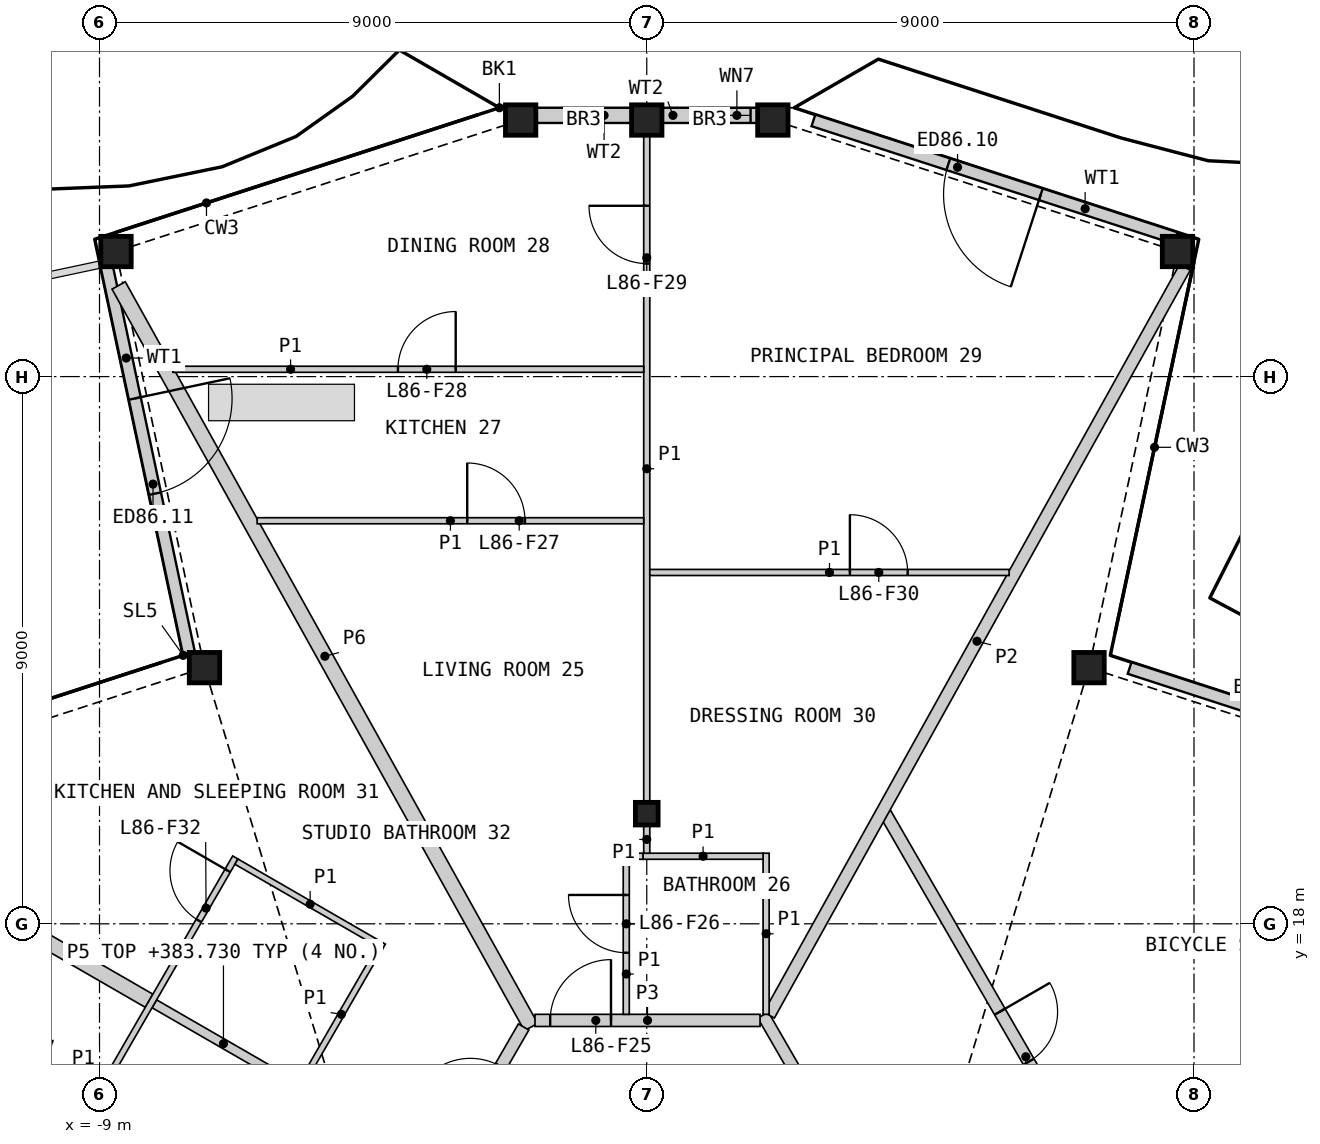
"""IFC4 building model, lengths in metres.
Left out: names, types, materials, properties, quantities, classifications, styles, units other than length and angle.
Written with IfcOpenShell. Run it as: python <this file> out.ifc"""

import sys

from ifc_helpers import new_model, si_unit, direction, frame, frame_2d, origin, origin_2d, place, context, subcontext, project, spatial, rectangle, hollow_rectangle, i_section, extrude, element, fill, save


model = new_model("IFC4")
c1 = context("Model", 3, precision=1e-05, world=origin(), true_north=direction((0.0, 1.0)))
c2 = subcontext(c1, "Body", "Model", "MODEL_VIEW")
j1 = project(units=[si_unit("LENGTHUNIT", "METRE"), si_unit("PLANEANGLEUNIT", "RADIAN")], contexts=[c1])
p1 = place(None, origin())
s1 = spatial("IfcSite", under=j1, at=p1, CompositionType="ELEMENT")
p2 = place(p1, origin())
s2 = spatial("IfcBuilding", under=s1, at=p2, CompositionType="ELEMENT")
p3 = place(p2, frame((0.0, 0.0, 381.4)))
s3 = spatial("IfcBuildingStorey", under=s2, at=p3, CompositionType="ELEMENT", Elevation=381.4)
for number, where, z_axis, x_axis in (
    (1, (7.274, 22.213, 0.0), (0.0, 0.0, 1.0), (1.0, 0.0, 0.0)),
    (2, (8.729, 29.057, 0.0), (0.0, 0.0, 1.0), (1.0, 0.0, 0.0)),
    (3, (2.074, 31.219, 0.0), (0.0, 0.0, 1.0), (1.0, 0.0, 0.0)),
    (4, (0.0, 31.219, 0.0), (0.0, 0.0, 1.0), (1.0, 0.0, 0.0)),
    (5, (-2.074, 31.219, 0.0), (0.0, 0.0, 1.0), (1.0, 0.0, 0.0)),
    (6, (-8.729, 29.057, 0.0), (0.0, 0.0, 1.0), (1.0, 0.0, 0.0)),
    (7, (-7.274, 22.213, 0.0), (0.0, 0.0, 1.0), (1.0, 0.0, 0.0)),
):
    element("IfcColumn", number, at=place(p3, frame(where, z_axis=z_axis, x_axis=x_axis)), inside=s3, PredefinedType="COLUMN", context=c2, shape_type="SweptSolid", body=[
        extrude(hollow_rectangle(XDim=0.5, YDim=0.5, WallThickness=0.03, at=origin_2d()), origin(), (0.0, 0.0, 1.0), 3.4),
    ])
p4 = place(p3, frame((0.0, 19.811, 0.0), z_axis=(0.0, 0.0, 1.0), x_axis=(1.0, 0.0, 0.0)))
e8 = element("IfcColumn", 8, at=p4, inside=s3, PredefinedType="COLUMN", context=c2, shape_type="SweptSolid", body=[
    extrude(i_section(OverallWidth=0.374, OverallDepth=0.372, WebThickness=0.016, FlangeThickness=0.026, at=origin_2d()), origin(), (0.0, 0.0, 1.0), 3.4),
])
p5 = place(p3, frame((13.899, 20.271, 0.0), z_axis=(0.0, 0.0, 1.0), x_axis=(-0.951056402988, 0.3090173431, 0.0)))
e9 = element("IfcWall", 9, at=p5, inside=s3, PredefinedType="SOLIDWALL", context=c2, shape_type="SweptSolid", body=[
    extrude(rectangle(XDim=6.265, YDim=0.2, at=frame_2d((3.133, 0.0))), origin(), (0.0, 0.0, 1.0), 2.634),
])
p6 = place(p5, frame((2.333, 0.0, 0.0)))
e10 = element("IfcOpeningElement", 10, at=p6, cuts=e9, PredefinedType="OPENING", context=c2, shape_type="SweptSolid", body=[
    extrude(rectangle(XDim=1.6, YDim=2.25, at=frame_2d((0.8, 1.125))), frame((0.0, 0.11, 0.0), z_axis=(0.0, -1.0, 0.0), x_axis=(1.0, 0.0, 0.0)), (0.0, 0.0, 1.0), 0.22),
])
p7 = place(p3, frame((8.699, 29.277, 0.0), z_axis=(0.0, 0.0, 1.0), x_axis=(-0.951048671744, 0.309041136379, 0.0)))
e11 = element("IfcWall", 11, at=p7, inside=s3, PredefinedType="SOLIDWALL", context=c2, shape_type="SweptSolid", body=[
    extrude(rectangle(XDim=6.265, YDim=0.2, at=frame_2d((3.133, 0.0))), origin(), (0.0, 0.0, 1.0), 2.634),
])
p8 = place(p7, frame((2.333, 0.0, 0.0)))
e12 = element("IfcOpeningElement", 12, at=p8, cuts=e11, PredefinedType="OPENING", context=c2, shape_type="SweptSolid", body=[
    extrude(rectangle(XDim=1.6, YDim=2.25, at=frame_2d((0.8, 1.125))), frame((0.0, 0.11, 0.0), z_axis=(0.0, -1.0, 0.0), x_axis=(1.0, 0.0, 0.0)), (0.0, 0.0, 1.0), 0.22),
])
p9 = place(p3, frame((2.058, 31.296, 0.0), z_axis=(0.0, 0.0, 1.0), x_axis=(-1.0, 0.0, 0.0)))
e13 = element("IfcWall", 13, at=p9, inside=s3, PredefinedType="SOLIDWALL", context=c2, shape_type="SweptSolid", body=[
    extrude(rectangle(XDim=1.808, YDim=0.25, at=frame_2d((0.904, 0.0))), origin(), (0.0, 0.0, 1.0), 2.634),
])
p10 = place(p9, frame((0.35, 0.0, 1.8)))
e14 = element("IfcOpeningElement", 14, at=p10, cuts=e13, PredefinedType="OPENING", context=c2, shape_type="SweptSolid", body=[
    extrude(rectangle(XDim=0.9, YDim=0.6, at=frame_2d((0.45, 0.3))), frame((0.0, 0.135, 0.0), z_axis=(0.0, -1.0, 0.0), x_axis=(1.0, 0.0, 0.0)), (0.0, 0.0, 1.0), 0.27),
])
p11 = place(p3, frame((-0.25, 31.296, 0.0), z_axis=(0.0, 0.0, 1.0), x_axis=(-1.0, 0.0, 0.0)))
e15 = element("IfcWall", 15, at=p11, inside=s3, PredefinedType="SOLIDWALL", context=c2, shape_type="SweptSolid", body=[
    extrude(rectangle(XDim=1.808, YDim=0.25, at=frame_2d((0.904, 0.0))), origin(), (0.0, 0.0, 1.0), 2.634),
])
p12 = place(p3, frame((-8.905, 28.922, 0.0), z_axis=(0.0, 0.0, 1.0), x_axis=(0.207917488951, -0.978146368285, 0.0)))
e16 = element("IfcWall", 16, at=p12, inside=s3, PredefinedType="SOLIDWALL", context=c2, shape_type="SweptSolid", body=[
    extrude(rectangle(XDim=6.612, YDim=0.2, at=frame_2d((3.306, 0.0))), origin(), (0.0, 0.0, 1.0), 2.634),
])
p13 = place(p12, frame((2.333, 0.0, 0.0)))
e17 = element("IfcOpeningElement", 17, at=p13, cuts=e16, PredefinedType="OPENING", context=c2, shape_type="SweptSolid", body=[
    extrude(rectangle(XDim=1.6, YDim=2.25, at=frame_2d((0.8, 1.125))), frame((0.0, 0.11, 0.0), z_axis=(0.0, -1.0, 0.0), x_axis=(1.0, 0.0, 0.0)), (0.0, 0.0, 1.0), 0.22),
])
p14 = place(p3, frame((-8.685, 28.499, 0.0), z_axis=(0.0, 0.0, 1.0), x_axis=(0.486017177904, -0.873949256412, 0.0)))
e18 = element("IfcWall", 18, at=p14, inside=s3, PredefinedType="PARTITIONING", context=c2, shape_type="SweptSolid", body=[
    extrude(rectangle(XDim=13.956, YDim=0.25, at=frame_2d((6.978, 0.0))), origin(), (0.0, 0.0, 1.0), 2.33),
])
p15 = place(p3, frame((-13.669, 19.9, 0.0), z_axis=(0.0, 0.0, 1.0), x_axis=(0.866032778651, -0.499987226139, 0.0)))
e19 = element("IfcWall", 19, at=p15, inside=s3, PredefinedType="PARTITIONING", context=c2, shape_type="SweptSolid", body=[
    extrude(rectangle(XDim=6.332, YDim=0.25, at=frame_2d((3.166, 0.0))), origin(), (0.0, 0.0, 1.0), 2.33),
])
p16 = place(p3, frame((1.913, 16.498, 0.0), z_axis=(0.0, 0.0, 1.0), x_axis=(0.499974648164, -0.866040040179, 0.0)))
e20 = element("IfcWall", 20, at=p16, inside=s3, PredefinedType="PARTITIONING", context=c2, shape_type="SweptSolid", body=[
    extrude(rectangle(XDim=4.525, YDim=0.2, at=frame_2d((2.263, 0.0))), origin(), (0.0, 0.0, 1.0), 3.1),
])
p17 = place(p3, frame((-4.176, 12.579, 0.0), z_axis=(0.0, 0.0, 1.0), x_axis=(0.500004215162, 0.866022970146, 0.0)))
e21 = element("IfcWall", 21, at=p17, inside=s3, PredefinedType="PARTITIONING", context=c2, shape_type="SweptSolid", body=[
    extrude(rectangle(XDim=4.3, YDim=0.2, at=frame_2d((2.15, 0.0))), origin(), (0.0, 0.0, 1.0), 3.1),
])
p18 = place(p17, frame((2.55, 0.0, 0.0)))
e22 = element("IfcOpeningElement", 22, at=p18, cuts=e21, PredefinedType="OPENING", context=c2, shape_type="SweptSolid", body=[
    extrude(rectangle(XDim=1.0, YDim=2.1, at=frame_2d((0.5, 1.05))), frame((0.0, 0.11, 0.0), z_axis=(0.0, -1.0, 0.0), x_axis=(1.0, 0.0, 0.0)), (0.0, 0.0, 1.0), 0.22),
])
p19 = place(p3, frame((-1.838, 16.411, 0.0), z_axis=(0.0, 0.0, 1.0), x_axis=(1.0, 0.0, 0.0)))
e23 = element("IfcWall", 23, at=p19, inside=s3, PredefinedType="PARTITIONING", context=c2, shape_type="SweptSolid", body=[
    extrude(rectangle(XDim=3.701, YDim=0.2, at=frame_2d((1.851, 0.0))), origin(), (0.0, 0.0, 1.0), 3.1),
])
p20 = place(p19, frame((0.25, 0.0, 0.0)))
e24 = element("IfcOpeningElement", 24, at=p20, cuts=e23, PredefinedType="OPENING", context=c2, shape_type="SweptSolid", body=[
    extrude(rectangle(XDim=1.0, YDim=2.1, at=frame_2d((0.5, 1.05))), frame((0.0, 0.11, 0.0), z_axis=(0.0, -1.0, 0.0), x_axis=(1.0, 0.0, 0.0)), (0.0, 0.0, 1.0), 0.22),
])
p21 = place(p3, frame((3.926, 19.811, 0.0), z_axis=(0.0, 0.0, 1.0), x_axis=(0.500001082559, -0.866024778768, 0.0)))
e25 = element("IfcWall", 25, at=p21, inside=s3, PredefinedType="PARTITIONING", context=c2, shape_type="SweptSolid", body=[
    extrude(rectangle(XDim=15.094, YDim=0.2, at=frame_2d((7.547, 0.0))), origin(), (0.0, 0.0, 1.0), 2.33),
])
p22 = place(p21, frame((3.761, 0.0, 0.0)))
e26 = element("IfcOpeningElement", 26, at=p22, cuts=e25, PredefinedType="OPENING", context=c2, shape_type="SweptSolid", body=[
    extrude(rectangle(XDim=0.95, YDim=2.1, at=frame_2d((0.475, 1.05))), frame((0.0, 0.11, 0.0), z_axis=(0.0, -1.0, 0.0), x_axis=(1.0, 0.0, 0.0)), (0.0, 0.0, 1.0), 0.22),
])
p23 = place(p3, frame((2.012, 16.498, 0.0), z_axis=(0.0, 0.0, 1.0), x_axis=(0.485991996179, 0.873963259897, 0.0)))
e27 = element("IfcWall", 27, at=p23, inside=s3, PredefinedType="PARTITIONING", context=c2, shape_type="SweptSolid", body=[
    extrude(rectangle(XDim=14.073, YDim=0.2, at=frame_2d((7.036, 0.0))), origin(), (0.0, 0.0, 1.0), 2.33),
])
p24 = place(p3, frame((-8.098, 16.684, 0.0), z_axis=(0.0, 0.0, 1.0), x_axis=(0.866036909293, -0.499980071345, 0.0)))
e28 = element("IfcWall", 28, at=p24, inside=s3, PredefinedType="PLUMBINGWALL", context=c2, shape_type="SweptSolid", body=[
    extrude(rectangle(XDim=2.625, YDim=0.15, at=frame_2d((1.312, 0.0))), origin(), (0.0, 0.0, 1.0), 2.33),
])
p25 = place(p3, frame((0.0, 20.008, 0.0), z_axis=(0.0, 0.0, 1.0), x_axis=(0.0, 1.0, 0.0)))
e29 = element("IfcWall", 29, at=p25, inside=s3, PredefinedType="PARTITIONING", context=c2, shape_type="SweptSolid", body=[
    extrude(rectangle(XDim=10.951, YDim=0.1, at=frame_2d((5.476, 0.0))), origin(), (0.0, 0.0, 1.0), 2.33),
])
p26 = place(p25, frame((8.851, 0.0, 0.0)))
e30 = element("IfcOpeningElement", 30, at=p26, cuts=e29, PredefinedType="OPENING", context=c2, shape_type="SweptSolid", body=[
    extrude(rectangle(XDim=0.95, YDim=2.1, at=frame_2d((0.475, 1.05))), frame((0.0, 0.06, 0.0), z_axis=(0.0, -1.0, 0.0), x_axis=(1.0, 0.0, 0.0)), (0.0, 0.0, 1.0), 0.12),
])
p27 = place(p3, frame((-7.793, 27.12, 0.0), z_axis=(0.0, 0.0, 1.0), x_axis=(1.0, 0.0, 0.0)))
e31 = element("IfcWall", 31, at=p27, inside=s3, PredefinedType="PARTITIONING", context=c2, shape_type="SweptSolid", body=[
    extrude(rectangle(XDim=7.743, YDim=0.1, at=frame_2d((3.872, 0.0))), origin(), (0.0, 0.0, 1.0), 2.33),
])
p28 = place(p27, frame((3.701, 0.0, 0.0)))
e32 = element("IfcOpeningElement", 32, at=p28, cuts=e31, PredefinedType="OPENING", context=c2, shape_type="SweptSolid", body=[
    extrude(rectangle(XDim=0.95, YDim=2.1, at=frame_2d((0.475, 1.05))), frame((0.0, 0.06, 0.0), z_axis=(0.0, -1.0, 0.0), x_axis=(1.0, 0.0, 0.0)), (0.0, 0.0, 1.0), 0.12),
])
p29 = place(p3, frame((-6.408, 24.629, 0.0), z_axis=(0.0, 0.0, 1.0), x_axis=(1.0, 0.0, 0.0)))
e33 = element("IfcWall", 33, at=p29, inside=s3, PredefinedType="PARTITIONING", context=c2, shape_type="SweptSolid", body=[
    extrude(rectangle(XDim=6.358, YDim=0.1, at=frame_2d((3.179, 0.0))), origin(), (0.0, 0.0, 1.0), 2.33),
])
p30 = place(p29, frame((3.455, 0.0, 0.0)))
e34 = element("IfcOpeningElement", 34, at=p30, cuts=e33, PredefinedType="OPENING", context=c2, shape_type="SweptSolid", body=[
    extrude(rectangle(XDim=0.95, YDim=2.1, at=frame_2d((0.475, 1.05))), frame((0.0, 0.06, 0.0), z_axis=(0.0, -1.0, 0.0), x_axis=(1.0, 0.0, 0.0)), (0.0, 0.0, 1.0), 0.12),
])
p31 = place(p3, frame((0.05, 23.778, 0.0), z_axis=(0.0, 0.0, 1.0), x_axis=(1.0, 0.0, 0.0)))
e35 = element("IfcWall", 35, at=p31, inside=s3, PredefinedType="PARTITIONING", context=c2, shape_type="SweptSolid", body=[
    extrude(rectangle(XDim=5.91, YDim=0.1, at=frame_2d((2.955, 0.0))), origin(), (0.0, 0.0, 1.0), 2.33),
])
p32 = place(p31, frame((3.291, 0.0, 0.0)))
e36 = element("IfcOpeningElement", 36, at=p32, cuts=e35, PredefinedType="OPENING", context=c2, shape_type="SweptSolid", body=[
    extrude(rectangle(XDim=0.95, YDim=2.1, at=frame_2d((0.475, 1.05))), frame((0.0, 0.06, 0.0), z_axis=(0.0, -1.0, 0.0), x_axis=(1.0, 0.0, 0.0)), (0.0, 0.0, 1.0), 0.12),
])
p33 = place(p3, frame((-9.517, 14.328, 0.0), z_axis=(0.0, 0.0, 1.0), x_axis=(0.499996545922, 0.866027397988, 0.0)))
e37 = element("IfcWall", 37, at=p33, inside=s3, PredefinedType="PARTITIONING", context=c2, shape_type="SweptSolid", body=[
    extrude(rectangle(XDim=5.5, YDim=0.1, at=frame_2d((2.75, 0.0))), origin(), (0.0, 0.0, 1.0), 2.33),
])
p34 = place(p33, frame((4.3, 0.0, 0.0)))
e38 = element("IfcOpeningElement", 38, at=p34, cuts=e37, PredefinedType="OPENING", context=c2, shape_type="SweptSolid", body=[
    extrude(rectangle(XDim=0.95, YDim=2.1, at=frame_2d((0.475, 1.05))), frame((0.0, 0.06, 0.0), z_axis=(0.0, -1.0, 0.0), x_axis=(1.0, 0.0, 0.0)), (0.0, 0.0, 1.0), 0.12),
])
p35 = place(p33, frame((0.25, 0.0, 0.0)))
e39 = element("IfcOpeningElement", 39, at=p35, cuts=e37, PredefinedType="OPENING", context=c2, shape_type="SweptSolid", body=[
    extrude(rectangle(XDim=0.95, YDim=2.1, at=frame_2d((0.475, 1.05))), frame((0.0, 0.06, 0.0), z_axis=(0.0, -1.0, 0.0), x_axis=(1.0, 0.0, 0.0)), (0.0, 0.0, 1.0), 0.12),
])
p36 = place(p3, frame((-6.748, 19.023, 0.0), z_axis=(0.0, 0.0, 1.0), x_axis=(0.866034573852, -0.49998411664, 0.0)))
e40 = element("IfcWall", 40, at=p36, inside=s3, PredefinedType="PARTITIONING", context=c2, shape_type="SweptSolid", body=[
    extrude(rectangle(XDim=2.8, YDim=0.1, at=frame_2d((1.4, 0.0))), origin(), (0.0, 0.0, 1.0), 2.33),
])
p37 = place(p3, frame((-5.654, 15.418, 0.0), z_axis=(0.0, 0.0, 1.0), x_axis=(0.500048846702, 0.865997200291, 0.0)))
e41 = element("IfcWall", 41, at=p37, inside=s3, PredefinedType="PARTITIONING", context=c2, shape_type="SweptSolid", body=[
    extrude(rectangle(XDim=2.525, YDim=0.1, at=frame_2d((1.263, 0.0))), origin(), (0.0, 0.0, 1.0), 2.33),
])
p38 = place(p3, frame((1.963, 16.511, 0.0), z_axis=(0.0, 0.0, 1.0), x_axis=(0.0, 1.0, 0.0)))
e42 = element("IfcWall", 42, at=p38, inside=s3, PredefinedType="PARTITIONING", context=c2, shape_type="SweptSolid", body=[
    extrude(rectangle(XDim=2.65, YDim=0.1, at=frame_2d((1.325, 0.0))), origin(), (0.0, 0.0, 1.0), 2.33),
])
p39 = place(p3, frame((-0.337, 16.511, 0.0), z_axis=(0.0, 0.0, 1.0), x_axis=(0.0, 1.0, 0.0)))
e43 = element("IfcWall", 43, at=p39, inside=s3, PredefinedType="PARTITIONING", context=c2, shape_type="SweptSolid", body=[
    extrude(rectangle(XDim=2.649, YDim=0.1, at=frame_2d((1.325, 0.0))), origin(), (0.0, 0.0, 1.0), 2.33),
])
p40 = place(p39, frame((1.013, 0.0, 0.0)))
e44 = element("IfcOpeningElement", 44, at=p40, cuts=e43, PredefinedType="OPENING", context=c2, shape_type="SweptSolid", body=[
    extrude(rectangle(XDim=0.95, YDim=2.1, at=frame_2d((0.475, 1.05))), frame((0.0, 0.06, 0.0), z_axis=(0.0, -1.0, 0.0), x_axis=(1.0, 0.0, 0.0)), (0.0, 0.0, 1.0), 0.12),
])
p41 = place(p3, frame((-0.06, 19.111, 0.0), z_axis=(0.0, 0.0, 1.0), x_axis=(1.0, 0.0, 0.0)))
e45 = element("IfcWall", 45, at=p41, inside=s3, PredefinedType="PARTITIONING", context=c2, shape_type="SweptSolid", body=[
    extrude(rectangle(XDim=1.973, YDim=0.1, at=frame_2d((0.987, 0.0))), origin(), (0.0, 0.0, 1.0), 2.33),
])
p42 = place(p3, frame((0.0, 19.161, 0.0), z_axis=(0.0, 0.0, 1.0), x_axis=(0.0, 1.0, 0.0)))
e46 = element("IfcWall", 46, at=p42, inside=s3, PredefinedType="PARTITIONING", context=c2, shape_type="SweptSolid", body=[
    extrude(rectangle(XDim=0.453, YDim=0.1, at=frame_2d((0.227, 0.0))), origin(), (0.0, 0.0, 1.0), 2.33),
])
p43 = place(p3, frame((-0.287, 19.11, 0.0), z_axis=(0.0, 0.0, 1.0), x_axis=(0.999994683407, 0.003260852229, 0.0)))
e47 = element("IfcWall", 47, at=p43, inside=s3, PredefinedType="PARTITIONING", context=c2, shape_type="SweptSolid", body=[
    extrude(rectangle(XDim=0.225, YDim=0.1, at=frame_2d((0.112, 0.0))), origin(), (0.0, 0.0, 1.0), 2.33),
])
p44 = place(p8, origin())
e48 = element("IfcDoor", 48, at=p44, inside=s3, OperationType="DOUBLE_DOOR_SINGLE_SWING", PredefinedType="DOOR", context=c2, shape_type="SweptSolid", body=[
    extrude(rectangle(XDim=1.6, YDim=2.25, at=frame_2d((0.8, 1.125))), frame((0.0, 0.025, 0.0), z_axis=(0.0, -1.0, 0.0), x_axis=(1.0, 0.0, 0.0)), (0.0, 0.0, 1.0), 0.05),
])
fill(e12, e48)
p45 = place(p10, origin())
e49 = element("IfcWindow", 49, at=p45, inside=s3, PartitioningType="SINGLE_PANEL", PredefinedType="WINDOW", context=c2, shape_type="SweptSolid", body=[
    extrude(rectangle(XDim=0.9, YDim=0.6, at=frame_2d((0.45, 0.3))), frame((0.0, 0.03, 0.0), z_axis=(0.0, -1.0, 0.0), x_axis=(1.0, 0.0, 0.0)), (0.0, 0.0, 1.0), 0.06),
])
fill(e14, e49)
p46 = place(p13, origin())
e50 = element("IfcDoor", 50, at=p46, inside=s3, OperationType="DOUBLE_DOOR_SINGLE_SWING", PredefinedType="DOOR", context=c2, shape_type="SweptSolid", body=[
    extrude(rectangle(XDim=1.6, YDim=2.25, at=frame_2d((0.8, 1.125))), frame((0.0, 0.025, 0.0), z_axis=(0.0, -1.0, 0.0), x_axis=(1.0, 0.0, 0.0)), (0.0, 0.0, 1.0), 0.05),
])
fill(e17, e50)
p47 = place(p22, origin())
e51 = element("IfcDoor", 51, at=p47, inside=s3, OperationType="SINGLE_SWING_LEFT", PredefinedType="DOOR", context=c2, shape_type="SweptSolid", body=[
    extrude(rectangle(XDim=0.95, YDim=2.1, at=frame_2d((0.475, 1.05))), frame((0.0, 0.025, 0.0), z_axis=(0.0, -1.0, 0.0), x_axis=(1.0, 0.0, 0.0)), (0.0, 0.0, 1.0), 0.05),
])
fill(e26, e51)
p48 = place(p20, origin())
e52 = element("IfcDoor", 52, at=p48, inside=s3, OperationType="SINGLE_SWING_RIGHT", PredefinedType="DOOR", context=c2, shape_type="SweptSolid", body=[
    extrude(rectangle(XDim=1.0, YDim=2.1, at=frame_2d((0.5, 1.05))), frame((0.0, 0.025, 0.0), z_axis=(0.0, -1.0, 0.0), x_axis=(1.0, 0.0, 0.0)), (0.0, 0.0, 1.0), 0.05),
])
fill(e24, e52)
p49 = place(p40, origin())
e53 = element("IfcDoor", 53, at=p49, inside=s3, OperationType="SINGLE_SWING_RIGHT", PredefinedType="DOOR", context=c2, shape_type="SweptSolid", body=[
    extrude(rectangle(XDim=0.95, YDim=2.1, at=frame_2d((0.475, 1.05))), frame((0.0, 0.025, 0.0), z_axis=(0.0, -1.0, 0.0), x_axis=(1.0, 0.0, 0.0)), (0.0, 0.0, 1.0), 0.05),
])
fill(e44, e53)
p50 = place(p30, origin())
e54 = element("IfcDoor", 54, at=p50, inside=s3, OperationType="SINGLE_SWING_LEFT", PredefinedType="DOOR", context=c2, shape_type="SweptSolid", body=[
    extrude(rectangle(XDim=0.95, YDim=2.1, at=frame_2d((0.475, 1.05))), frame((0.0, 0.025, 0.0), z_axis=(0.0, -1.0, 0.0), x_axis=(1.0, 0.0, 0.0)), (0.0, 0.0, 1.0), 0.05),
])
fill(e34, e54)
p51 = place(p28, origin())
e55 = element("IfcDoor", 55, at=p51, inside=s3, OperationType="SINGLE_SWING_RIGHT", PredefinedType="DOOR", context=c2, shape_type="SweptSolid", body=[
    extrude(rectangle(XDim=0.95, YDim=2.1, at=frame_2d((0.475, 1.05))), frame((0.0, 0.025, 0.0), z_axis=(0.0, -1.0, 0.0), x_axis=(1.0, 0.0, 0.0)), (0.0, 0.0, 1.0), 0.05),
])
fill(e32, e55)
p52 = place(p26, origin())
e56 = element("IfcDoor", 56, at=p52, inside=s3, OperationType="SINGLE_SWING_RIGHT", PredefinedType="DOOR", context=c2, shape_type="SweptSolid", body=[
    extrude(rectangle(XDim=0.95, YDim=2.1, at=frame_2d((0.475, 1.05))), frame((0.0, 0.025, 0.0), z_axis=(0.0, -1.0, 0.0), x_axis=(1.0, 0.0, 0.0)), (0.0, 0.0, 1.0), 0.05),
])
fill(e30, e56)
p53 = place(p32, origin())
e57 = element("IfcDoor", 57, at=p53, inside=s3, OperationType="SINGLE_SWING_LEFT", PredefinedType="DOOR", context=c2, shape_type="SweptSolid", body=[
    extrude(rectangle(XDim=0.95, YDim=2.1, at=frame_2d((0.475, 1.05))), frame((0.0, 0.025, 0.0), z_axis=(0.0, -1.0, 0.0), x_axis=(1.0, 0.0, 0.0)), (0.0, 0.0, 1.0), 0.05),
])
fill(e36, e57)
p54 = place(p34, origin())
e58 = element("IfcDoor", 58, at=p54, inside=s3, OperationType="SINGLE_SWING_RIGHT", PredefinedType="DOOR", context=c2, shape_type="SweptSolid", body=[
    extrude(rectangle(XDim=0.95, YDim=2.1, at=frame_2d((0.475, 1.05))), frame((0.0, 0.025, 0.0), z_axis=(0.0, -1.0, 0.0), x_axis=(1.0, 0.0, 0.0)), (0.0, 0.0, 1.0), 0.05),
])
fill(e38, e58)
save(model, sys.argv[1])
